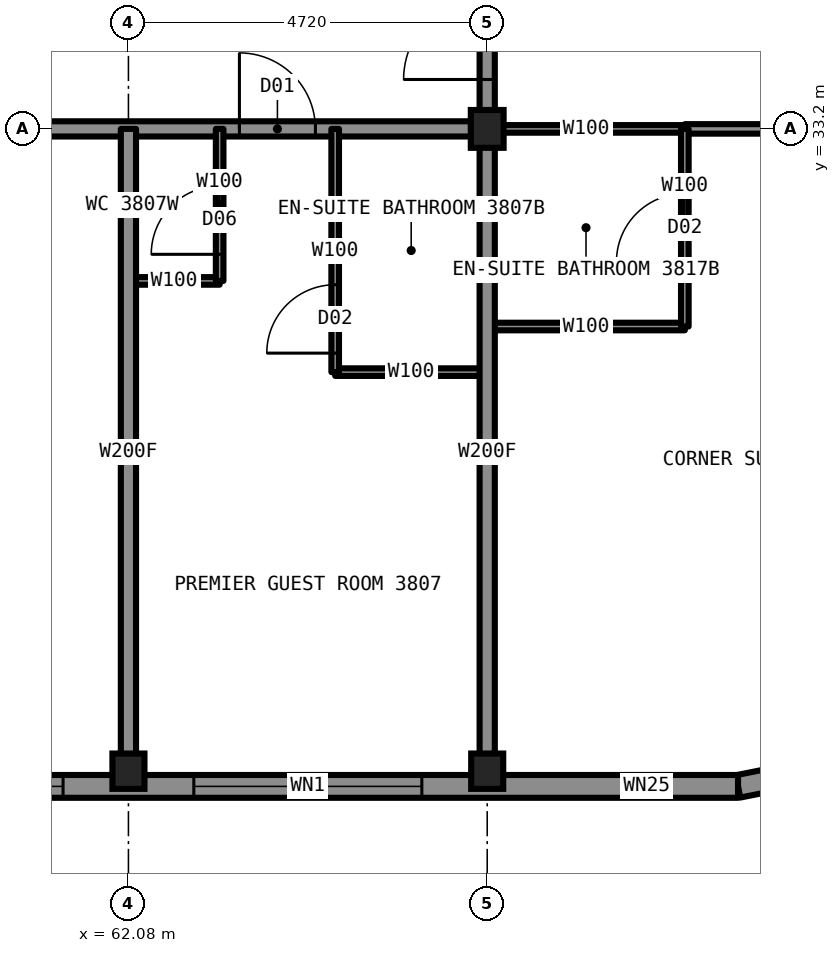
"""IFC4 building model, lengths in metres.
Left out: names, types, materials, properties, quantities, classifications, styles, units other than length and angle.
Written with IfcOpenShell. Run it as: python <this file> out.ifc"""

import sys

from ifc_helpers import new_model, si_unit, direction, frame, frame_2d, origin, origin_2d, place, context, subcontext, project, spatial, rectangle, i_section, extrude, element, fill, save


model = new_model("IFC4")
c1 = context("Model", 3, precision=1e-05, world=origin(), true_north=direction((0.0, 1.0)))
c2 = subcontext(c1, "Body", "Model", "MODEL_VIEW")
j1 = project(units=[si_unit("LENGTHUNIT", "METRE"), si_unit("PLANEANGLEUNIT", "RADIAN")], contexts=[c1])
p1 = place(None, origin())
s1 = spatial("IfcSite", under=j1, at=p1, CompositionType="ELEMENT")
p2 = place(p1, origin())
s2 = spatial("IfcBuilding", under=s1, at=p2, CompositionType="ELEMENT")
p3 = place(p2, frame((0.0, 0.0, 135.4)))
s3 = spatial("IfcBuildingStorey", under=s2, at=p3, CompositionType="ELEMENT", Elevation=135.4)
for number, where, z_axis, x_axis in (
    (1, (62.08, 24.75, 0.0), (0.0, 0.0, 1.0), (1.0, 0.0, 0.0)),
    (2, (66.8, 24.75, 0.0), (0.0, 0.0, 1.0), (1.0, 0.0, 0.0)),
):
    element("IfcColumn", number, at=place(p3, frame(where, z_axis=z_axis, x_axis=x_axis)), inside=s3, PredefinedType="COLUMN", context=c2, shape_type="SweptSolid", body=[
        extrude(i_section(OverallWidth=0.422, OverallDepth=0.465, WebThickness=0.045, FlangeThickness=0.073, at=origin_2d()), origin(), (0.0, 0.0, 1.0), 3.5),
    ])
p4 = place(p3, frame((66.8, 33.2, 0.0), z_axis=(0.0, 0.0, 1.0), x_axis=(1.0, 0.0, 0.0)))
e3 = element("IfcColumn", 3, at=p4, inside=s3, PredefinedType="COLUMN", context=c2, shape_type="SweptSolid", body=[
    extrude(i_section(OverallWidth=0.432, OverallDepth=0.498, WebThickness=0.056, FlangeThickness=0.089, at=origin_2d()), origin(), (0.0, 0.0, 1.0), 3.5),
])
p5 = place(p3, frame((66.8, 33.2, 0.0), z_axis=(0.0, 0.0, 1.0), x_axis=(1.0, 0.0, 0.0)))
e4 = element("IfcWall", 4, at=p5, inside=s3, PredefinedType="PARTITIONING", context=c2, shape_type="SweptSolid", body=[
    extrude(rectangle(XDim=2.6, YDim=0.1, at=frame_2d((1.3, 0.0))), origin(), (0.0, 0.0, 1.0), 2.573),
])
p6 = place(p3, frame((43.2, 33.2, 0.0), z_axis=(0.0, 0.0, 1.0), x_axis=(1.0, 0.0, 0.0)))
e5 = element("IfcWall", 5, at=p6, inside=s3, PredefinedType="PARTITIONING", context=c2, shape_type="SweptSolid", body=[
    extrude(rectangle(XDim=23.6, YDim=0.2, at=frame_2d((11.8, 0.0))), origin(), (0.0, 0.0, 1.0), 3.33),
])
p7 = place(p6, frame((3.0, 0.0, 0.0)))
e6 = element("IfcOpeningElement", 6, at=p7, cuts=e5, PredefinedType="OPENING", context=c2, shape_type="SweptSolid", body=[
    extrude(rectangle(XDim=1.0, YDim=2.2, at=frame_2d((0.5, 1.1))), frame((0.0, 0.11, 0.0), z_axis=(0.0, -1.0, 0.0), x_axis=(1.0, 0.0, 0.0)), (0.0, 0.0, 1.0), 0.22),
])
p8 = place(p6, frame((9.84, 0.0, 0.0)))
e7 = element("IfcOpeningElement", 7, at=p8, cuts=e5, PredefinedType="OPENING", context=c2, shape_type="SweptSolid", body=[
    extrude(rectangle(XDim=1.0, YDim=2.2, at=frame_2d((0.5, 1.1))), frame((0.0, 0.11, 0.0), z_axis=(0.0, -1.0, 0.0), x_axis=(1.0, 0.0, 0.0)), (0.0, 0.0, 1.0), 0.22),
])
p9 = place(p6, frame((16.71, 0.0, 0.0)))
e8 = element("IfcOpeningElement", 8, at=p9, cuts=e5, PredefinedType="OPENING", context=c2, shape_type="SweptSolid", body=[
    extrude(rectangle(XDim=1.0, YDim=2.2, at=frame_2d((0.5, 1.1))), frame((0.0, 0.11, 0.0), z_axis=(0.0, -1.0, 0.0), x_axis=(1.0, 0.0, 0.0)), (0.0, 0.0, 1.0), 0.22),
])
p10 = place(p6, frame((20.34, 0.0, 0.0)))
e9 = element("IfcOpeningElement", 9, at=p10, cuts=e5, PredefinedType="OPENING", context=c2, shape_type="SweptSolid", body=[
    extrude(rectangle(XDim=1.0, YDim=2.2, at=frame_2d((0.5, 1.1))), frame((0.0, 0.11, 0.0), z_axis=(0.0, -1.0, 0.0), x_axis=(1.0, 0.0, 0.0)), (0.0, 0.0, 1.0), 0.22),
])
p11 = place(p3, frame((69.4, 33.2, 0.0), z_axis=(0.0, 0.0, 1.0), x_axis=(1.0, 0.0, 0.0)))
e10 = element("IfcWall", 10, at=p11, inside=s3, PredefinedType="PARTITIONING", context=c2, shape_type="SweptSolid", body=[
    extrude(rectangle(XDim=5.9, YDim=0.125, at=frame_2d((2.95, 0.0))), origin(), (0.0, 0.0, 1.0), 2.573),
])
p12 = place(p11, frame((1.15, 0.0, 0.0)))
e11 = element("IfcOpeningElement", 11, at=p12, cuts=e10, PredefinedType="OPENING", context=c2, shape_type="SweptSolid", body=[
    extrude(rectangle(XDim=0.9, YDim=2.2, at=frame_2d((0.45, 1.1))), frame((0.0, 0.073, 0.0), z_axis=(0.0, -1.0, 0.0), x_axis=(1.0, 0.0, 0.0)), (0.0, 0.0, 1.0), 0.145),
])
p13 = place(p3, frame((62.08, 31.2, 0.0), z_axis=(0.0, 0.0, 1.0), x_axis=(1.0, 0.0, 0.0)))
e12 = element("IfcWall", 12, at=p13, inside=s3, PredefinedType="PARTITIONING", context=c2, shape_type="SweptSolid", body=[
    extrude(rectangle(XDim=1.2, YDim=0.1, at=frame_2d((0.6, 0.0))), origin(), (0.0, 0.0, 1.0), 3.33),
])
p14 = place(p3, frame((66.8, 30.6, 0.0), z_axis=(0.0, 0.0, 1.0), x_axis=(1.0, 0.0, 0.0)))
e13 = element("IfcWall", 13, at=p14, inside=s3, PredefinedType="PARTITIONING", context=c2, shape_type="SweptSolid", body=[
    extrude(rectangle(XDim=2.6, YDim=0.1, at=frame_2d((1.3, 0.0))), origin(), (0.0, 0.0, 1.0), 3.33),
])
p15 = place(p3, frame((64.8, 30.0, 0.0), z_axis=(0.0, 0.0, 1.0), x_axis=(1.0, 0.0, 0.0)))
e14 = element("IfcWall", 14, at=p15, inside=s3, PredefinedType="PARTITIONING", context=c2, shape_type="SweptSolid", body=[
    extrude(rectangle(XDim=2.0, YDim=0.1, at=frame_2d((1.0, 0.0))), origin(), (0.0, 0.0, 1.0), 2.731),
])
p16 = place(p3, frame((66.8, 33.2, 0.0), z_axis=(0.0, 0.0, 1.0), x_axis=(0.0, 1.0, 0.0)))
e15 = element("IfcWall", 15, at=p16, inside=s3, PredefinedType="PARTITIONING", context=c2, shape_type="SweptSolid", body=[
    extrude(rectangle(XDim=23.6, YDim=0.2, at=frame_2d((11.8, 0.0))), origin(), (0.0, 0.0, 1.0), 3.33),
])
p17 = place(p16, frame((7.27, 0.0, 0.0)))
e16 = element("IfcOpeningElement", 16, at=p17, cuts=e15, PredefinedType="OPENING", context=c2, shape_type="SweptSolid", body=[
    extrude(rectangle(XDim=1.0, YDim=2.2, at=frame_2d((0.5, 1.1))), frame((0.0, 0.11, 0.0), z_axis=(0.0, -1.0, 0.0), x_axis=(1.0, 0.0, 0.0)), (0.0, 0.0, 1.0), 0.22),
])
p18 = place(p16, frame((11.99, 0.0, 0.0)))
e17 = element("IfcOpeningElement", 17, at=p18, cuts=e15, PredefinedType="OPENING", context=c2, shape_type="SweptSolid", body=[
    extrude(rectangle(XDim=1.0, YDim=2.2, at=frame_2d((0.5, 1.1))), frame((0.0, 0.11, 0.0), z_axis=(0.0, -1.0, 0.0), x_axis=(1.0, 0.0, 0.0)), (0.0, 0.0, 1.0), 0.22),
])
p19 = place(p16, frame((17.31, 0.0, 0.0)))
e18 = element("IfcOpeningElement", 18, at=p19, cuts=e15, PredefinedType="OPENING", context=c2, shape_type="SweptSolid", body=[
    extrude(rectangle(XDim=1.0, YDim=2.2, at=frame_2d((0.5, 1.1))), frame((0.0, 0.11, 0.0), z_axis=(0.0, -1.0, 0.0), x_axis=(1.0, 0.0, 0.0)), (0.0, 0.0, 1.0), 0.22),
])
p20 = place(p16, frame((21.85, 0.0, 0.0)))
e19 = element("IfcOpeningElement", 19, at=p20, cuts=e15, PredefinedType="OPENING", context=c2, shape_type="SweptSolid", body=[
    extrude(rectangle(XDim=1.1, YDim=2.2, at=frame_2d((0.55, 1.1))), frame((0.0, 0.11, 0.0), z_axis=(0.0, -1.0, 0.0), x_axis=(1.0, 0.0, 0.0)), (0.0, 0.0, 1.0), 0.22),
])
p21 = place(p16, frame((0.65, 0.0, 0.0)))
e20 = element("IfcOpeningElement", 20, at=p21, cuts=e15, PredefinedType="OPENING", context=c2, shape_type="SweptSolid", body=[
    extrude(rectangle(XDim=1.1, YDim=2.2, at=frame_2d((0.55, 1.1))), frame((0.0, 0.11, 0.0), z_axis=(0.0, -1.0, 0.0), x_axis=(1.0, 0.0, 0.0)), (0.0, 0.0, 1.0), 0.22),
])
p22 = place(p3, frame((66.8, 24.7, 0.0), z_axis=(0.0, 0.0, 1.0), x_axis=(0.0, 1.0, 0.0)))
e21 = element("IfcWall", 21, at=p22, inside=s3, PredefinedType="PARTITIONING", context=c2, shape_type="SweptSolid", body=[
    extrude(rectangle(XDim=8.5, YDim=0.2, at=frame_2d((4.25, 0.0))), origin(), (0.0, 0.0, 1.0), 2.573),
])
p23 = place(p3, frame((69.4, 30.6, 0.0), z_axis=(0.0, 0.0, 1.0), x_axis=(0.0, 1.0, 0.0)))
e22 = element("IfcWall", 22, at=p23, inside=s3, PredefinedType="PARTITIONING", context=c2, shape_type="SweptSolid", body=[
    extrude(rectangle(XDim=2.6, YDim=0.1, at=frame_2d((1.3, 0.0))), origin(), (0.0, 0.0, 1.0), 3.33),
])
p24 = place(p23, frame((0.85, 0.0, 0.0)))
e23 = element("IfcOpeningElement", 23, at=p24, cuts=e22, PredefinedType="OPENING", context=c2, shape_type="SweptSolid", body=[
    extrude(rectangle(XDim=0.9, YDim=2.1, at=frame_2d((0.45, 1.05))), frame((0.0, 0.06, 0.0), z_axis=(0.0, -1.0, 0.0), x_axis=(1.0, 0.0, 0.0)), (0.0, 0.0, 1.0), 0.12),
])
p25 = place(p3, frame((62.08, 24.7, 0.0), z_axis=(0.0, 0.0, 1.0), x_axis=(0.0, 1.0, 0.0)))
e24 = element("IfcWall", 24, at=p25, inside=s3, PredefinedType="PARTITIONING", context=c2, shape_type="SweptSolid", body=[
    extrude(rectangle(XDim=8.5, YDim=0.2, at=frame_2d((4.25, 0.0))), origin(), (0.0, 0.0, 1.0), 2.573),
])
p26 = place(p3, frame((63.28, 31.2, 0.0), z_axis=(0.0, 0.0, 1.0), x_axis=(0.0, 1.0, 0.0)))
e25 = element("IfcWall", 25, at=p26, inside=s3, PredefinedType="PARTITIONING", context=c2, shape_type="SweptSolid", body=[
    extrude(rectangle(XDim=2.0, YDim=0.1, at=frame_2d((1.0, 0.0))), origin(), (0.0, 0.0, 1.0), 3.33),
])
p27 = place(p26, frame((0.35, 0.0, 0.0)))
e26 = element("IfcOpeningElement", 26, at=p27, cuts=e25, PredefinedType="OPENING", context=c2, shape_type="SweptSolid", body=[
    extrude(rectangle(XDim=0.9, YDim=2.1, at=frame_2d((0.45, 1.05))), frame((0.0, 0.06, 0.0), z_axis=(0.0, -1.0, 0.0), x_axis=(1.0, 0.0, 0.0)), (0.0, 0.0, 1.0), 0.12),
])
p28 = place(p3, frame((64.8, 30.0, 0.0), z_axis=(0.0, 0.0, 1.0), x_axis=(0.0, 1.0, 0.0)))
e27 = element("IfcWall", 27, at=p28, inside=s3, PredefinedType="PARTITIONING", context=c2, shape_type="SweptSolid", body=[
    extrude(rectangle(XDim=3.2, YDim=0.1, at=frame_2d((1.6, 0.0))), origin(), (0.0, 0.0, 1.0), 3.33),
])
p29 = place(p28, frame((0.25, 0.0, 0.0)))
e28 = element("IfcOpeningElement", 28, at=p29, cuts=e27, PredefinedType="OPENING", context=c2, shape_type="SweptSolid", body=[
    extrude(rectangle(XDim=0.9, YDim=2.1, at=frame_2d((0.45, 1.05))), frame((0.0, 0.06, 0.0), z_axis=(0.0, -1.0, 0.0), x_axis=(1.0, 0.0, 0.0)), (0.0, 0.0, 1.0), 0.12),
])
p30 = place(p3, frame((70.1, 24.55, 0.0), z_axis=(0.0, 0.0, 1.0), x_axis=(0.980787050784, 0.195081421501, 0.0)))
e29 = element("IfcWall", 29, at=p30, inside=s3, PredefinedType="SOLIDWALL", context=c2, shape_type="SweptSolid", body=[
    extrude(rectangle(XDim=2.087, YDim=0.3, at=frame_2d((1.044, 0.0))), origin(), (0.0, 0.0, 1.0), 3.33),
])
p31 = place(p30, frame((0.444, 0.0, 0.5)))
e30 = element("IfcOpeningElement", 30, at=p31, cuts=e29, PredefinedType="OPENING", context=c2, shape_type="SweptSolid", body=[
    extrude(rectangle(XDim=1.2, YDim=2.0, at=frame_2d((0.6, 1.0))), frame((0.0, 0.16, 0.0), z_axis=(0.0, -1.0, 0.0), x_axis=(1.0, 0.0, 0.0)), (0.0, 0.0, 1.0), 0.32),
])
p32 = place(p3, frame((39.9, 24.55, 0.0), z_axis=(0.0, 0.0, 1.0), x_axis=(1.0, 0.0, 0.0)))
e31 = element("IfcWall", 31, at=p32, inside=s3, PredefinedType="SOLIDWALL", context=c2, shape_type="SweptSolid", body=[
    extrude(rectangle(XDim=30.2, YDim=0.3, at=frame_2d((15.1, 0.0))), origin(), (0.0, 0.0, 1.0), 2.83),
])
p33 = place(p32, frame((0.85, 0.0, 0.5)))
e32 = element("IfcOpeningElement", 32, at=p33, cuts=e31, PredefinedType="OPENING", context=c2, shape_type="SweptSolid", body=[
    extrude(rectangle(XDim=1.6, YDim=2.0, at=frame_2d((0.8, 1.0))), frame((0.0, 0.16, 0.0), z_axis=(0.0, -1.0, 0.0), x_axis=(1.0, 0.0, 0.0)), (0.0, 0.0, 1.0), 0.32),
])
p34 = place(p32, frame((4.16, 0.0, 0.5)))
e33 = element("IfcOpeningElement", 33, at=p34, cuts=e31, PredefinedType="OPENING", context=c2, shape_type="SweptSolid", body=[
    extrude(rectangle(XDim=1.3, YDim=1.9, at=frame_2d((0.65, 0.95))), frame((0.0, 0.16, 0.0), z_axis=(0.0, -1.0, 0.0), x_axis=(1.0, 0.0, 0.0)), (0.0, 0.0, 1.0), 0.32),
])
p35 = place(p32, frame((8.88, 0.0, 0.5)))
e34 = element("IfcOpeningElement", 34, at=p35, cuts=e31, PredefinedType="OPENING", context=c2, shape_type="SweptSolid", body=[
    extrude(rectangle(XDim=3.0, YDim=2.0, at=frame_2d((1.5, 1.0))), frame((0.0, 0.16, 0.0), z_axis=(0.0, -1.0, 0.0), x_axis=(1.0, 0.0, 0.0)), (0.0, 0.0, 1.0), 0.32),
])
p36 = place(p32, frame((13.6, 0.0, 0.5)))
e35 = element("IfcOpeningElement", 35, at=p36, cuts=e31, PredefinedType="OPENING", context=c2, shape_type="SweptSolid", body=[
    extrude(rectangle(XDim=3.0, YDim=2.0, at=frame_2d((1.5, 1.0))), frame((0.0, 0.16, 0.0), z_axis=(0.0, -1.0, 0.0), x_axis=(1.0, 0.0, 0.0)), (0.0, 0.0, 1.0), 0.32),
])
p37 = place(p32, frame((18.32, 0.0, 0.5)))
e36 = element("IfcOpeningElement", 36, at=p37, cuts=e31, PredefinedType="OPENING", context=c2, shape_type="SweptSolid", body=[
    extrude(rectangle(XDim=3.0, YDim=2.0, at=frame_2d((1.5, 1.0))), frame((0.0, 0.16, 0.0), z_axis=(0.0, -1.0, 0.0), x_axis=(1.0, 0.0, 0.0)), (0.0, 0.0, 1.0), 0.32),
])
p38 = place(p32, frame((24.69, 0.0, 0.5)))
e37 = element("IfcOpeningElement", 37, at=p38, cuts=e31, PredefinedType="OPENING", context=c2, shape_type="SweptSolid", body=[
    extrude(rectangle(XDim=1.3, YDim=1.9, at=frame_2d((0.65, 0.95))), frame((0.0, 0.16, 0.0), z_axis=(0.0, -1.0, 0.0), x_axis=(1.0, 0.0, 0.0)), (0.0, 0.0, 1.0), 0.32),
])
p39 = place(p32, frame((27.75, 0.0, 0.5)))
e38 = element("IfcOpeningElement", 38, at=p39, cuts=e31, PredefinedType="OPENING", context=c2, shape_type="SweptSolid", body=[
    extrude(rectangle(XDim=1.6, YDim=2.0, at=frame_2d((0.8, 1.0))), frame((0.0, 0.16, 0.0), z_axis=(0.0, -1.0, 0.0), x_axis=(1.0, 0.0, 0.0)), (0.0, 0.0, 1.0), 0.32),
])
p40 = place(p32, frame((5.51, 0.0, 0.5)))
e39 = element("IfcOpeningElement", 39, at=p40, cuts=e31, PredefinedType="OPENING", context=c2, shape_type="SweptSolid", body=[
    extrude(rectangle(XDim=0.7, YDim=0.9, at=frame_2d((0.35, 0.45))), frame((0.0, 0.16, 0.0), z_axis=(0.0, -1.0, 0.0), x_axis=(1.0, 0.0, 0.0)), (0.0, 0.0, 1.0), 0.32),
])
p41 = place(p32, frame((23.99, 0.0, 0.5)))
e40 = element("IfcOpeningElement", 40, at=p41, cuts=e31, PredefinedType="OPENING", context=c2, shape_type="SweptSolid", body=[
    extrude(rectangle(XDim=0.7, YDim=0.9, at=frame_2d((0.35, 0.45))), frame((0.0, 0.16, 0.0), z_axis=(0.0, -1.0, 0.0), x_axis=(1.0, 0.0, 0.0)), (0.0, 0.0, 1.0), 0.32),
])
p42 = place(p10, origin())
e41 = element("IfcDoor", 41, at=p42, inside=s3, OperationType="SINGLE_SWING_LEFT", PredefinedType="DOOR", context=c2, shape_type="SweptSolid", body=[
    extrude(rectangle(XDim=1.0, YDim=2.2, at=frame_2d((0.5, 1.1))), frame((0.0, 0.025, 0.0), z_axis=(0.0, -1.0, 0.0), x_axis=(1.0, 0.0, 0.0)), (0.0, 0.0, 1.0), 0.05),
])
fill(e9, e41)
p43 = place(p29, origin())
e42 = element("IfcDoor", 42, at=p43, inside=s3, OperationType="SINGLE_SWING_RIGHT", PredefinedType="DOOR", context=c2, shape_type="SweptSolid", body=[
    extrude(rectangle(XDim=0.9, YDim=2.1, at=frame_2d((0.45, 1.05))), frame((0.0, 0.025, 0.0), z_axis=(0.0, -1.0, 0.0), x_axis=(1.0, 0.0, 0.0)), (0.0, 0.0, 1.0), 0.05),
])
fill(e28, e42)
p44 = place(p27, origin())
e43 = element("IfcDoor", 43, at=p44, inside=s3, OperationType="SINGLE_SWING_LEFT", PredefinedType="DOOR", context=c2, shape_type="SweptSolid", body=[
    extrude(rectangle(XDim=0.9, YDim=2.1, at=frame_2d((0.45, 1.05))), frame((0.0, 0.025, 0.0), z_axis=(0.0, -1.0, 0.0), x_axis=(1.0, 0.0, 0.0)), (0.0, 0.0, 1.0), 0.05),
])
fill(e26, e43)
p45 = place(p21, origin())
e44 = element("IfcDoor", 44, at=p45, inside=s3, OperationType="SINGLE_SWING_LEFT", PredefinedType="DOOR", context=c2, shape_type="SweptSolid", body=[
    extrude(rectangle(XDim=1.1, YDim=2.2, at=frame_2d((0.55, 1.1))), frame((0.0, 0.025, 0.0), z_axis=(0.0, -1.0, 0.0), x_axis=(1.0, 0.0, 0.0)), (0.0, 0.0, 1.0), 0.05),
])
fill(e20, e44)
p46 = place(p24, origin())
e45 = element("IfcDoor", 45, at=p46, inside=s3, OperationType="SINGLE_SWING_RIGHT", PredefinedType="DOOR", context=c2, shape_type="SweptSolid", body=[
    extrude(rectangle(XDim=0.9, YDim=2.1, at=frame_2d((0.45, 1.05))), frame((0.0, 0.025, 0.0), z_axis=(0.0, -1.0, 0.0), x_axis=(1.0, 0.0, 0.0)), (0.0, 0.0, 1.0), 0.05),
])
fill(e23, e45)
p47 = place(p37, origin())
e46 = element("IfcWindow", 46, at=p47, inside=s3, PartitioningType="SINGLE_PANEL", PredefinedType="WINDOW", context=c2, shape_type="SweptSolid", body=[
    extrude(rectangle(XDim=3.0, YDim=2.0, at=frame_2d((1.5, 1.0))), frame((0.0, 0.03, 0.0), z_axis=(0.0, -1.0, 0.0), x_axis=(1.0, 0.0, 0.0)), (0.0, 0.0, 1.0), 0.06),
])
fill(e36, e46)
p48 = place(p38, origin())
e47 = element("IfcWindow", 47, at=p48, inside=s3, PartitioningType="SINGLE_PANEL", PredefinedType="WINDOW", context=c2, shape_type="SweptSolid", body=[
    extrude(rectangle(XDim=1.3, YDim=1.9, at=frame_2d((0.65, 0.95))), frame((0.0, 0.03, 0.0), z_axis=(0.0, -1.0, 0.0), x_axis=(1.0, 0.0, 0.0)), (0.0, 0.0, 1.0), 0.06),
])
fill(e37, e47)
p49 = place(p39, origin())
e48 = element("IfcWindow", 48, at=p49, inside=s3, PartitioningType="SINGLE_PANEL", PredefinedType="WINDOW", context=c2, shape_type="SweptSolid", body=[
    extrude(rectangle(XDim=1.6, YDim=2.0, at=frame_2d((0.8, 1.0))), frame((0.0, 0.03, 0.0), z_axis=(0.0, -1.0, 0.0), x_axis=(1.0, 0.0, 0.0)), (0.0, 0.0, 1.0), 0.06),
])
fill(e38, e48)
p50 = place(p41, origin())
e49 = element("IfcWindow", 49, at=p50, inside=s3, PartitioningType="SINGLE_PANEL", PredefinedType="WINDOW", context=c2, shape_type="SweptSolid", body=[
    extrude(rectangle(XDim=0.7, YDim=0.9, at=frame_2d((0.35, 0.45))), frame((0.0, 0.03, 0.0), z_axis=(0.0, -1.0, 0.0), x_axis=(1.0, 0.0, 0.0)), (0.0, 0.0, 1.0), 0.06),
])
fill(e40, e49)
save(model, sys.argv[1])
